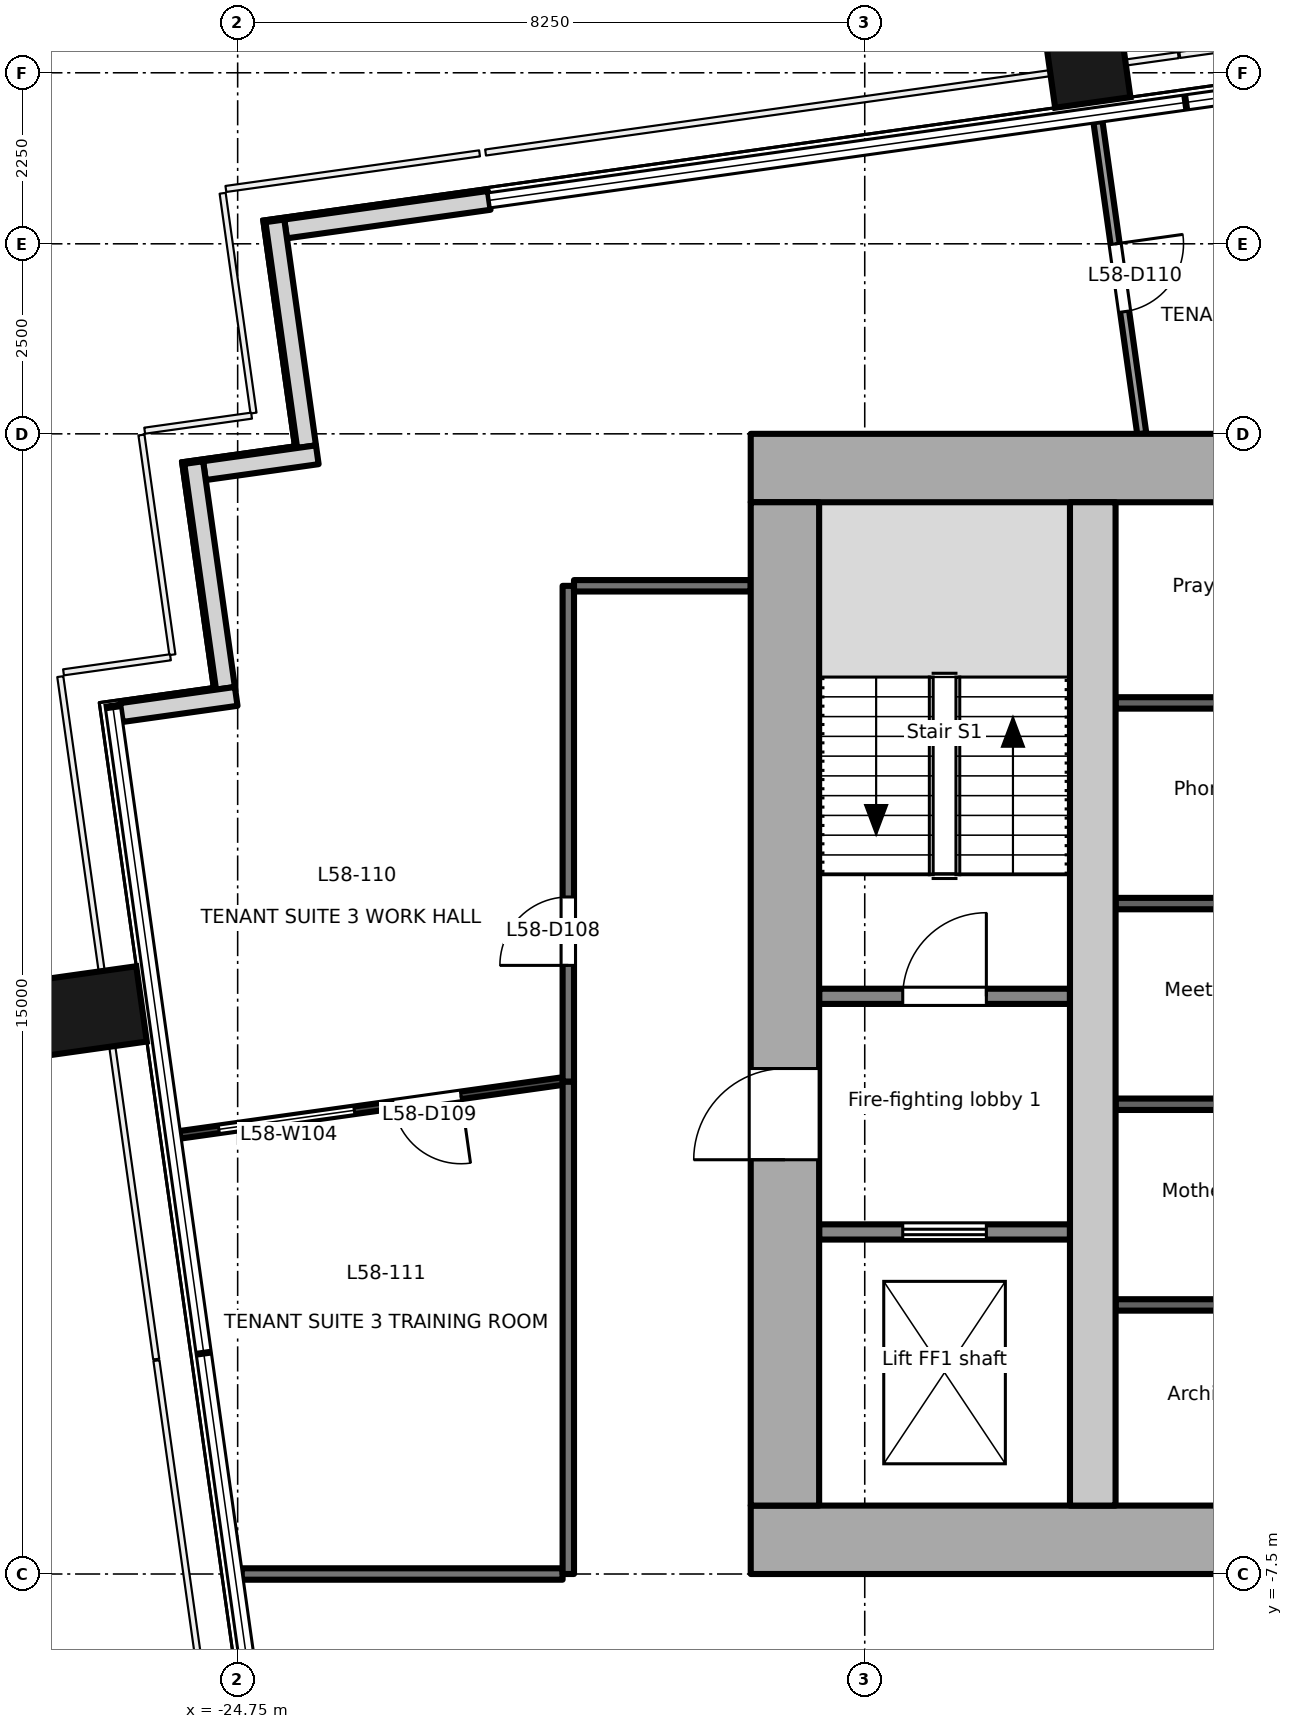
"""IFC4 building model, lengths in metres.
Left out: names, types, materials, properties, quantities, classifications, styles, units other than length and angle.
Written with IfcOpenShell. Run it as: python <this file> out.ifc"""

import sys

from ifc_helpers import new_model, si_unit, direction, frame, frame_2d, origin, origin_2d, place, context, subcontext, project, spatial, rectangle, extrude, element, fill, save


model = new_model("IFC4")
c1 = context("Model", 3, precision=1e-05, world=origin(), true_north=direction((0.0, 1.0)))
c2 = subcontext(c1, "Body", "Model", "MODEL_VIEW")
j1 = project(units=[si_unit("LENGTHUNIT", "METRE"), si_unit("PLANEANGLEUNIT", "RADIAN")], contexts=[c1])
p1 = place(None, origin())
s1 = spatial("IfcSite", under=j1, at=p1, CompositionType="ELEMENT")
p2 = place(p1, origin())
s2 = spatial("IfcBuilding", under=s1, at=p2, CompositionType="ELEMENT")
p3 = place(p2, frame((0.0, 0.0, 255.1)))
s3 = spatial("IfcBuildingStorey", under=s2, at=p3, CompositionType="ELEMENT", Elevation=255.1)
for number, where, z_axis, x_axis in (
    (1, (-26.906, -0.125, -0.2), (0.0, 0.0, 1.0), (-0.139, 0.99, 0.0)),
    (2, (-13.625, 12.751, -0.2), (0.0, 0.0, 1.0), (0.99, 0.139, 0.0)),
):
    element("IfcColumn", number, at=place(p3, frame(where, z_axis=z_axis, x_axis=x_axis)), inside=s3, PredefinedType="COLUMN", context=c2, shape_type="SweptSolid", body=[
        extrude(rectangle(XDim=1.0, YDim=1.8, at=origin_2d()), origin(), (0.0, 0.0, 1.0), 3.9),
    ])
p4 = place(p3, frame((-21.44, 10.572, 0.0), z_axis=(0.0, 0.0, 1.0), x_axis=(-0.990293105353, -0.138994839796, 0.0)))
e3 = element("IfcWall", 3, at=p4, inside=s3, PredefinedType="SOLIDWALL", context=c2, shape_type="SweptSolid", body=[
    extrude(rectangle(XDim=2.705, YDim=0.25, at=frame_2d((1.353, 0.0))), origin(), (0.0, 0.0, 1.0), 3.7),
])
p5 = place(p3, frame((-24.26, 10.302, 0.0), z_axis=(0.0, 0.0, 1.0), x_axis=(0.138994228812, -0.990293191109, 0.0)))
e4 = element("IfcWall", 4, at=p5, inside=s3, PredefinedType="SOLIDWALL", context=c2, shape_type="SweptSolid", body=[
    extrude(rectangle(XDim=3.0, YDim=0.25, at=frame_2d((1.5, 0.0))), origin(), (0.0, 0.0, 1.0), 3.7),
])
p6 = place(p3, frame((-23.702, 7.225, 0.0), z_axis=(0.0, 0.0, 1.0), x_axis=(-0.990243596651, -0.13934711799, 0.0)))
e5 = element("IfcWall", 5, at=p6, inside=s3, PredefinedType="SOLIDWALL", context=c2, shape_type="SweptSolid", body=[
    extrude(rectangle(XDim=1.5, YDim=0.25, at=frame_2d((0.75, 0.0))), origin(), (0.0, 0.0, 1.0), 3.7),
])
p7 = place(p3, frame((-25.328, 7.122, 0.0), z_axis=(0.0, 0.0, 1.0), x_axis=(0.139358350296, -0.990242015975, 0.0)))
e6 = element("IfcWall", 6, at=p7, inside=s3, PredefinedType="SOLIDWALL", context=c2, shape_type="SweptSolid", body=[
    extrude(rectangle(XDim=2.999, YDim=0.25, at=frame_2d((1.5, 0.0))), origin(), (0.0, 0.0, 1.0), 3.7),
])
p8 = place(p3, frame((-24.769, 4.046, 0.0), z_axis=(0.0, 0.0, 1.0), x_axis=(-0.990260716096, -0.139225407725, 0.0)))
e7 = element("IfcWall", 7, at=p8, inside=s3, PredefinedType="SOLIDWALL", context=c2, shape_type="SweptSolid", body=[
    extrude(rectangle(XDim=1.526, YDim=0.25, at=frame_2d((0.763, 0.0))), origin(), (0.0, 0.0, 1.0), 3.7),
])
p9 = place(p3, frame((-18.0, -7.05, -0.2), z_axis=(0.0, 0.0, 1.0), x_axis=(1.0, 0.0, 0.0)))
e8 = element("IfcWall", 8, at=p9, inside=s3, PredefinedType="SHEAR", context=c2, shape_type="SweptSolid", body=[
    extrude(rectangle(XDim=36.0, YDim=0.9, at=frame_2d((18.0, 0.0))), origin(), (0.0, 0.0, 1.0), 3.9),
])
p10 = place(p9, frame((8.1, 0.0, 0.2)))
e9 = element("IfcOpeningElement", 9, at=p10, cuts=e8, PredefinedType="OPENING", context=c2, shape_type="SweptSolid", body=[
    extrude(rectangle(XDim=1.8, YDim=2.1, at=frame_2d((0.9, 1.05))), frame((0.0, 0.46, 0.0), z_axis=(0.0, -1.0, 0.0), x_axis=(1.0, 0.0, 0.0)), (0.0, 0.0, 1.0), 0.921),
])
p11 = place(p9, frame((16.8, 0.0, 0.2)))
e10 = element("IfcOpeningElement", 10, at=p11, cuts=e8, PredefinedType="OPENING", context=c2, shape_type="SweptSolid", body=[
    extrude(rectangle(XDim=2.4, YDim=2.1, at=frame_2d((1.2, 1.05))), frame((0.0, 0.46, 0.0), z_axis=(0.0, -1.0, 0.0), x_axis=(1.0, 0.0, 0.0)), (0.0, 0.0, 1.0), 0.921),
])
p12 = place(p9, frame((26.1, 0.0, 0.2)))
e11 = element("IfcOpeningElement", 11, at=p12, cuts=e8, PredefinedType="OPENING", context=c2, shape_type="SweptSolid", body=[
    extrude(rectangle(XDim=2.4, YDim=2.1, at=frame_2d((1.2, 1.05))), frame((0.0, 0.46, 0.0), z_axis=(0.0, -1.0, 0.0), x_axis=(1.0, 0.0, 0.0)), (0.0, 0.0, 1.0), 0.921),
])
p13 = place(p3, frame((-18.0, 7.05, -0.2), z_axis=(0.0, 0.0, 1.0), x_axis=(1.0, 0.0, 0.0)))
e12 = element("IfcWall", 12, at=p13, inside=s3, PredefinedType="SHEAR", context=c2, shape_type="SweptSolid", body=[
    extrude(rectangle(XDim=36.0, YDim=0.9, at=frame_2d((18.0, 0.0))), origin(), (0.0, 0.0, 1.0), 3.9),
])
p14 = place(p3, frame((-17.55, -6.6, -0.2), z_axis=(0.0, 0.0, 1.0), x_axis=(0.0, 1.0, 0.0)))
e13 = element("IfcWall", 13, at=p14, inside=s3, PredefinedType="SHEAR", context=c2, shape_type="SweptSolid", body=[
    extrude(rectangle(XDim=13.2, YDim=0.9, at=frame_2d((6.6, 0.0))), origin(), (0.0, 0.0, 1.0), 3.9),
])
p15 = place(p14, frame((4.55, 0.0, 0.2)))
e14 = element("IfcOpeningElement", 14, at=p15, cuts=e13, PredefinedType="OPENING", context=c2, shape_type="SweptSolid", body=[
    extrude(rectangle(XDim=1.2, YDim=2.1, at=frame_2d((0.6, 1.05))), frame((0.0, 0.46, 0.0), z_axis=(0.0, -1.0, 0.0), x_axis=(1.0, 0.0, 0.0)), (0.0, 0.0, 1.0), 0.921),
])
p16 = place(p3, frame((-13.5, -6.6, -0.2), z_axis=(0.0, 0.0, 1.0), x_axis=(0.0, 1.0, 0.0)))
e15 = element("IfcWall", 15, at=p16, inside=s3, PredefinedType="SHEAR", context=c2, shape_type="SweptSolid", body=[
    extrude(rectangle(XDim=13.2, YDim=0.6, at=frame_2d((6.6, 0.0))), origin(), (0.0, 0.0, 1.0), 3.9),
])
p17 = place(p3, frame((-17.1, -3.0, 0.0), z_axis=(0.0, 0.0, 1.0), x_axis=(1.0, 0.0, 0.0)))
e16 = element("IfcWall", 16, at=p17, inside=s3, PredefinedType="PARTITIONING", context=c2, shape_type="SweptSolid", body=[
    extrude(rectangle(XDim=3.3, YDim=0.2, at=frame_2d((1.65, 0.0))), origin(), (0.0, 0.0, 1.0), 3.7),
])
p18 = place(p17, frame((1.1, 0.0, 0.0)))
e17 = element("IfcOpeningElement", 17, at=p18, cuts=e16, PredefinedType="OPENING", context=c2, shape_type="SweptSolid", body=[
    extrude(rectangle(XDim=1.1, YDim=2.1, at=frame_2d((0.55, 1.05))), frame((0.0, 0.111, 0.0), z_axis=(0.0, -1.0, 0.0), x_axis=(1.0, 0.0, 0.0)), (0.0, 0.0, 1.0), 0.221),
])
p19 = place(p3, frame((-17.1, 0.1, 0.0), z_axis=(0.0, 0.0, 1.0), x_axis=(1.0, 0.0, 0.0)))
e18 = element("IfcWall", 18, at=p19, inside=s3, PredefinedType="PARTITIONING", context=c2, shape_type="SweptSolid", body=[
    extrude(rectangle(XDim=3.3, YDim=0.2, at=frame_2d((1.65, 0.0))), origin(), (0.0, 0.0, 1.0), 3.7),
])
p20 = place(p19, frame((1.1, 0.0, 0.0)))
e19 = element("IfcOpeningElement", 19, at=p20, cuts=e18, PredefinedType="OPENING", context=c2, shape_type="SweptSolid", body=[
    extrude(rectangle(XDim=1.1, YDim=2.1, at=frame_2d((0.55, 1.05))), frame((0.0, 0.111, 0.0), z_axis=(0.0, -1.0, 0.0), x_axis=(1.0, 0.0, 0.0)), (0.0, 0.0, 1.0), 0.221),
])
for number, where, z_axis, x_axis in (
    (20, (-13.2, -3.96, 0.0), (0.0, 0.0, 1.0), (1.0, 0.0, 0.0)),
    (21, (-13.2, -1.32, 0.0), (0.0, 0.0, 1.0), (1.0, 0.0, 0.0)),
    (22, (-13.2, 1.32, 0.0), (0.0, 0.0, 1.0), (1.0, 0.0, 0.0)),
    (23, (-13.2, 3.96, 0.0), (0.0, 0.0, 1.0), (1.0, 0.0, 0.0)),
):
    element("IfcWall", number, at=place(p3, frame(where, z_axis=z_axis, x_axis=x_axis)), inside=s3, PredefinedType="PARTITIONING", context=c2, shape_type="SweptSolid", body=[
        extrude(rectangle(XDim=3.05, YDim=0.15, at=frame_2d((1.525, 0.0))), origin(), (0.0, 0.0, 1.0), 3.7),
    ])
p21 = place(p3, frame((-20.4, -1.024, 0.0), z_axis=(0.0, 0.0, 1.0), x_axis=(0.0, 1.0, 0.0)))
e24 = element("IfcWall", 24, at=p21, inside=s3, PredefinedType="PARTITIONING", context=c2, shape_type="SweptSolid", body=[
    extrude(rectangle(XDim=6.524, YDim=0.15, at=frame_2d((3.262, 0.0))), origin(), (0.0, 0.0, 1.0), 3.3),
])
p22 = place(p21, frame((1.531, 0.0, 0.0)))
e25 = element("IfcOpeningElement", 25, at=p22, cuts=e24, PredefinedType="OPENING", context=c2, shape_type="SweptSolid", body=[
    extrude(rectangle(XDim=0.9, YDim=2.1, at=frame_2d((0.45, 1.05))), frame((0.0, 0.085, 0.0), z_axis=(0.0, -1.0, 0.0), x_axis=(1.0, 0.0, 0.0)), (0.0, 0.0, 1.0), 0.171),
])
p23 = place(p3, frame((-20.325, 5.501, 0.0), z_axis=(0.0, 0.0, 1.0), x_axis=(1.0, 0.0, 0.0)))
e26 = element("IfcWall", 26, at=p23, inside=s3, PredefinedType="PARTITIONING", context=c2, shape_type="SweptSolid", body=[
    extrude(rectangle(XDim=2.325, YDim=0.15, at=frame_2d((1.163, 0.0))), origin(), (0.0, 0.0, 1.0), 3.7),
])
p24 = place(p3, frame((-24.696, -7.5, 0.0), z_axis=(0.0, 0.0, 1.0), x_axis=(1.0, 0.0, 0.0)))
e27 = element("IfcWall", 27, at=p24, inside=s3, PredefinedType="PARTITIONING", context=c2, shape_type="SweptSolid", body=[
    extrude(rectangle(XDim=4.221, YDim=0.15, at=frame_2d((2.11, 0.0))), origin(), (0.0, 0.0, 1.0), 3.7),
])
p25 = place(p3, frame((-20.4, -7.5, 0.0), z_axis=(0.0, 0.0, 1.0), x_axis=(0.0, 1.0, 0.0)))
e28 = element("IfcWall", 28, at=p25, inside=s3, PredefinedType="PARTITIONING", context=c2, shape_type="SweptSolid", body=[
    extrude(rectangle(XDim=6.476, YDim=0.15, at=frame_2d((3.238, 0.0))), origin(), (0.0, 0.0, 1.0), 3.3),
])
p26 = place(p3, frame((-20.468, -1.014, 0.0), z_axis=(0.0, 0.0, 1.0), x_axis=(-0.990280538481, -0.139084345292, 0.0)))
e29 = element("IfcWall", 29, at=p26, inside=s3, PredefinedType="PARTITIONING", context=c2, shape_type="SweptSolid", body=[
    extrude(rectangle(XDim=5.091, YDim=0.1, at=frame_2d((2.545, 0.0))), origin(), (0.0, 0.0, 1.0), 3.7),
])
p27 = place(p26, frame((1.357, 0.0, 0.0)))
e30 = element("IfcOpeningElement", 30, at=p27, cuts=e29, PredefinedType="OPENING", context=c2, shape_type="SweptSolid", body=[
    extrude(rectangle(XDim=0.9, YDim=2.1, at=frame_2d((0.45, 1.05))), frame((0.0, 0.061, 0.0), z_axis=(0.0, -1.0, 0.0), x_axis=(1.0, 0.0, 0.0)), (0.0, 0.0, 1.0), 0.121),
])
p28 = place(p26, frame((2.774, 0.0, 0.9)))
e31 = element("IfcOpeningElement", 31, at=p28, cuts=e29, PredefinedType="OPENING", context=c2, shape_type="SweptSolid", body=[
    extrude(rectangle(XDim=1.8, YDim=1.2, at=frame_2d((0.9, 0.6))), frame((0.0, 0.061, 0.0), z_axis=(0.0, -1.0, 0.0), x_axis=(1.0, 0.0, 0.0)), (0.0, 0.0, 1.0), 0.121),
])
p29 = place(p3, frame((-13.432, 11.607, 0.0), z_axis=(0.0, 0.0, 1.0), x_axis=(0.139105101842, -0.990277623014, 0.0)))
e32 = element("IfcWall", 32, at=p29, inside=s3, PredefinedType="PARTITIONING", context=c2, shape_type="SweptSolid", body=[
    extrude(rectangle(XDim=4.147, YDim=0.12, at=frame_2d((2.074, 0.0))), origin(), (0.0, 0.0, 1.0), 3.4),
])
p30 = place(p29, frame((1.624, 0.0, 0.0)))
e33 = element("IfcOpeningElement", 33, at=p30, cuts=e32, PredefinedType="OPENING", context=c2, shape_type="SweptSolid", body=[
    extrude(rectangle(XDim=0.9, YDim=2.1, at=frame_2d((0.45, 1.05))), frame((0.0, 0.071, 0.0), z_axis=(0.0, -1.0, 0.0), x_axis=(1.0, 0.0, 0.0)), (0.0, 0.0, 1.0), 0.141),
])
p31 = place(p18, origin())
e34 = element("IfcDoor", 34, at=p31, inside=s3, OperationType="DOUBLE_DOOR_SLIDING", PredefinedType="DOOR", context=c2, shape_type="SweptSolid", body=[
    extrude(rectangle(XDim=1.1, YDim=2.1, at=frame_2d((0.55, 1.05))), frame((0.0, 0.025, 0.0), z_axis=(0.0, -1.0, 0.0), x_axis=(1.0, 0.0, 0.0)), (0.0, 0.0, 1.0), 0.05),
])
fill(e17, e34)
p32 = place(p15, origin())
e35 = element("IfcDoor", 35, at=p32, inside=s3, OperationType="SINGLE_SWING_LEFT", PredefinedType="DOOR", context=c2, shape_type="SweptSolid", body=[
    extrude(rectangle(XDim=1.2, YDim=2.1, at=frame_2d((0.6, 1.05))), frame((0.0, 0.025, 0.0), z_axis=(0.0, -1.0, 0.0), x_axis=(1.0, 0.0, 0.0)), (0.0, 0.0, 1.0), 0.05),
])
fill(e14, e35)
p33 = place(p20, origin())
e36 = element("IfcDoor", 36, at=p33, inside=s3, OperationType="SINGLE_SWING_RIGHT", PredefinedType="DOOR", context=c2, shape_type="SweptSolid", body=[
    extrude(rectangle(XDim=1.1, YDim=2.1, at=frame_2d((0.55, 1.05))), frame((0.0, 0.025, 0.0), z_axis=(0.0, -1.0, 0.0), x_axis=(1.0, 0.0, 0.0)), (0.0, 0.0, 1.0), 0.05),
])
fill(e19, e36)
p34 = place(p22, origin())
e37 = element("IfcDoor", 37, at=p34, inside=s3, OperationType="SINGLE_SWING_LEFT", PredefinedType="DOOR", context=c2, shape_type="SweptSolid", body=[
    extrude(rectangle(XDim=0.9, YDim=2.1, at=frame_2d((0.45, 1.05))), frame((0.0, 0.025, 0.0), z_axis=(0.0, -1.0, 0.0), x_axis=(1.0, 0.0, 0.0)), (0.0, 0.0, 1.0), 0.05),
])
fill(e25, e37)
p35 = place(p27, origin())
e38 = element("IfcDoor", 38, at=p35, inside=s3, OperationType="SINGLE_SWING_LEFT", PredefinedType="DOOR", context=c2, shape_type="SweptSolid", body=[
    extrude(rectangle(XDim=0.9, YDim=2.1, at=frame_2d((0.45, 1.05))), frame((0.0, 0.025, 0.0), z_axis=(0.0, -1.0, 0.0), x_axis=(1.0, 0.0, 0.0)), (0.0, 0.0, 1.0), 0.05),
])
fill(e30, e38)
p36 = place(p30, origin())
e39 = element("IfcDoor", 39, at=p36, inside=s3, OperationType="SINGLE_SWING_LEFT", PredefinedType="DOOR", context=c2, shape_type="SweptSolid", body=[
    extrude(rectangle(XDim=0.9, YDim=2.1, at=frame_2d((0.45, 1.05))), frame((0.0, 0.025, 0.0), z_axis=(0.0, -1.0, 0.0), x_axis=(1.0, 0.0, 0.0)), (0.0, 0.0, 1.0), 0.05),
])
fill(e33, e39)
p37 = place(p28, origin())
e40 = element("IfcWindow", 40, at=p37, inside=s3, PartitioningType="SINGLE_PANEL", PredefinedType="WINDOW", context=c2, shape_type="SweptSolid", body=[
    extrude(rectangle(XDim=1.8, YDim=1.2, at=frame_2d((0.9, 0.6))), frame((0.0, 0.03, 0.0), z_axis=(0.0, -1.0, 0.0), x_axis=(1.0, 0.0, 0.0)), (0.0, 0.0, 1.0), 0.06),
])
fill(e31, e40)
save(model, sys.argv[1])
